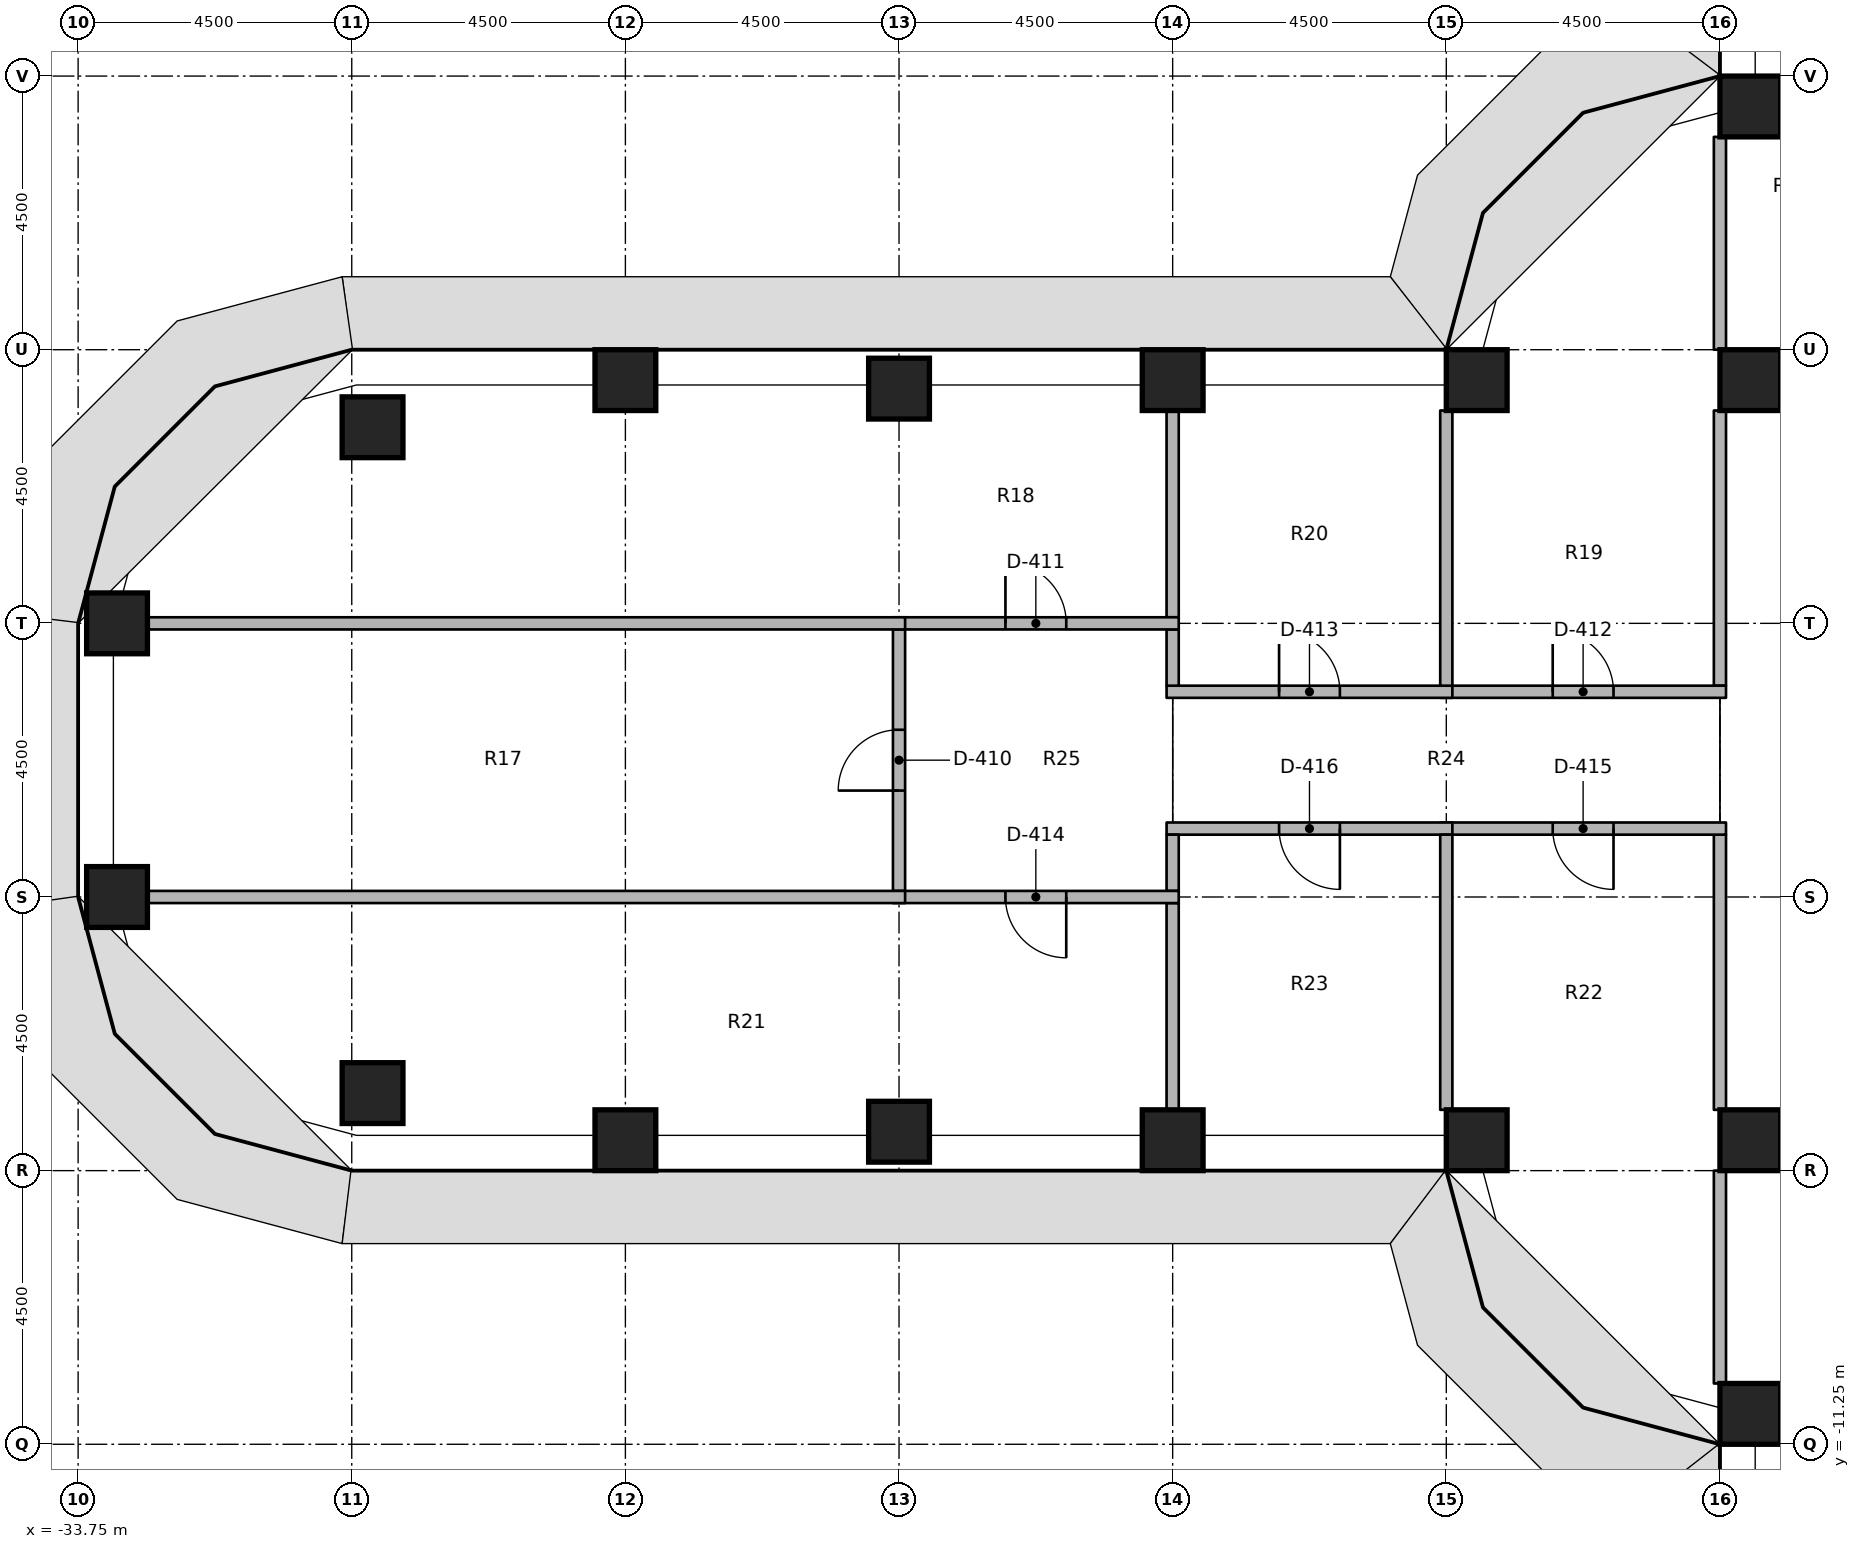
"""IFC4 building model, lengths in metres.
Left out: names, types, materials, properties, quantities, classifications, styles, units other than length and angle.
Written with IfcOpenShell. Run it as: python <this file> out.ifc"""

import sys

from ifc_helpers import new_model, si_unit, direction, frame, frame_2d, origin, origin_2d, place, context, subcontext, project, spatial, rectangle, extrude, element, fill, save


model = new_model("IFC4")
c1 = context("Model", 3, precision=1e-05, world=origin(), true_north=direction((0.0, 1.0)))
c2 = subcontext(c1, "Body", "Model", "MODEL_VIEW")
j1 = project(units=[si_unit("LENGTHUNIT", "METRE"), si_unit("PLANEANGLEUNIT", "RADIAN")], contexts=[c1])
p1 = place(None, origin())
s1 = spatial("IfcSite", under=j1, at=p1, CompositionType="ELEMENT")
p2 = place(p1, origin())
s2 = spatial("IfcBuilding", under=s1, at=p2, CompositionType="ELEMENT")
p3 = place(p2, frame((0.0, 0.0, 56.4)))
s3 = spatial("IfcBuildingStorey", under=s2, at=p3, CompositionType="ELEMENT", Elevation=56.4)
for number, where, z_axis, x_axis in (
    (1, (-33.11, -2.25, 0.0), (0.0, 0.0, 1.0), (1.0, 0.0, 0.0)),
    (2, (-33.11, 2.25, 0.0), (0.0, 0.0, 1.0), (1.0, 0.0, 0.0)),
    (3, (-28.908, -5.475, 0.0), (0.0, 0.0, 1.0), (1.0, 0.0, 0.0)),
    (4, (-28.908, 5.475, 0.0), (0.0, 0.0, 1.0), (1.0, 0.0, 0.0)),
    (5, (-24.75, -6.25, 0.0), (0.0, 0.0, 1.0), (1.0, 0.0, 0.0)),
    (6, (-24.75, 6.25, 0.0), (0.0, 0.0, 1.0), (1.0, 0.0, 0.0)),
    (7, (-20.25, -6.11, 0.0), (0.0, 0.0, 1.0), (1.0, 0.0, 0.0)),
    (8, (-20.25, 6.11, 0.0), (0.0, 0.0, 1.0), (1.0, 0.0, 0.0)),
    (9, (-15.75, -6.25, 0.0), (0.0, 0.0, 1.0), (1.0, 0.0, 0.0)),
    (10, (-15.75, 6.25, 0.0), (0.0, 0.0, 1.0), (1.0, 0.0, 0.0)),
    (11, (-10.75, -6.25, 0.0), (0.0, 0.0, 1.0), (1.0, 0.0, 0.0)),
    (12, (-10.75, 6.25, 0.0), (0.0, 0.0, 1.0), (1.0, 0.0, 0.0)),
    (13, (-6.25, -10.75, 0.0), (0.0, 0.0, 1.0), (1.0, 0.0, 0.0)),
    (14, (-6.25, -6.25, 0.0), (0.0, 0.0, 1.0), (1.0, 0.0, 0.0)),
    (15, (-6.25, 6.25, 0.0), (0.0, 0.0, 1.0), (1.0, 0.0, 0.0)),
    (16, (-6.25, 10.75, 0.0), (0.0, 0.0, 1.0), (1.0, 0.0, 0.0)),
):
    element("IfcColumn", number, at=place(p3, frame(where, z_axis=z_axis, x_axis=x_axis)), inside=s3, PredefinedType="COLUMN", context=c2, shape_type="SweptSolid", body=[
        extrude(rectangle(XDim=1.0, YDim=1.0, at=origin_2d()), origin(), (0.0, 0.0, 1.0), 4.05),
    ])
p4 = place(p3, frame((-6.75, 1.225, 0.0), z_axis=(0.0, 0.0, 1.0), x_axis=(0.0, 1.0, 0.0)))
e17 = element("IfcWall", 17, at=p4, inside=s3, PredefinedType="PARTITIONING", context=c2, shape_type="SweptSolid", body=[
    extrude(rectangle(XDim=4.525, YDim=0.2, at=frame_2d((2.262, 0.0))), origin(), (0.0, 0.0, 1.0), 3.131),
])
for number, where, z_axis, x_axis in (
    (18, (-6.75, 6.75, 0.0), (0.0, 0.0, 1.0), (0.0, 1.0, 0.0)),
    (19, (-6.75, -10.25, 0.0), (0.0, 0.0, 1.0), (0.0, 1.0, 0.0)),
):
    element("IfcWall", number, at=place(p3, frame(where, z_axis=z_axis, x_axis=x_axis)), inside=s3, PredefinedType="PARTITIONING", context=c2, shape_type="SweptSolid", body=[
        extrude(rectangle(XDim=3.5, YDim=0.2, at=frame_2d((1.75, 0.0))), origin(), (0.0, 0.0, 1.0), 3.131),
    ])
p5 = place(p3, frame((-6.75, -5.75, 0.0), z_axis=(0.0, 0.0, 1.0), x_axis=(0.0, 1.0, 0.0)))
e20 = element("IfcWall", 20, at=p5, inside=s3, PredefinedType="PARTITIONING", context=c2, shape_type="SweptSolid", body=[
    extrude(rectangle(XDim=4.525, YDim=0.2, at=frame_2d((2.262, 0.0))), origin(), (0.0, 0.0, 1.0), 3.131),
])
p6 = place(p3, frame((-11.35, 1.125, 0.0), z_axis=(0.0, 0.0, 1.0), x_axis=(1.0, 0.0, 0.0)))
e21 = element("IfcWall", 21, at=p6, inside=s3, PredefinedType="PARTITIONING", context=c2, shape_type="SweptSolid", body=[
    extrude(rectangle(XDim=4.7, YDim=0.2, at=frame_2d((2.35, 0.0))), origin(), (0.0, 0.0, 1.0), 3.131),
])
p7 = place(p6, frame((1.85, 0.0, 0.0)))
e22 = element("IfcOpeningElement", 22, at=p7, cuts=e21, PredefinedType="OPENING", context=c2, shape_type="SweptSolid", body=[
    extrude(rectangle(XDim=1.0, YDim=2.1, at=frame_2d((0.5, 1.05))), frame((0.0, 0.11, 0.0), z_axis=(0.0, -1.0, 0.0), x_axis=(1.0, 0.0, 0.0)), (0.0, 0.0, 1.0), 0.22),
])
p8 = place(p3, frame((-6.65, -1.125, 0.0), z_axis=(0.0, 0.0, 1.0), x_axis=(-1.0, 0.0, 0.0)))
e23 = element("IfcWall", 23, at=p8, inside=s3, PredefinedType="PARTITIONING", context=c2, shape_type="SweptSolid", body=[
    extrude(rectangle(XDim=4.7, YDim=0.2, at=frame_2d((2.35, 0.0))), origin(), (0.0, 0.0, 1.0), 3.131),
])
p9 = place(p8, frame((1.85, 0.0, 0.0)))
e24 = element("IfcOpeningElement", 24, at=p9, cuts=e23, PredefinedType="OPENING", context=c2, shape_type="SweptSolid", body=[
    extrude(rectangle(XDim=1.0, YDim=2.1, at=frame_2d((0.5, 1.05))), frame((0.0, 0.11, 0.0), z_axis=(0.0, -1.0, 0.0), x_axis=(1.0, 0.0, 0.0)), (0.0, 0.0, 1.0), 0.22),
])
p10 = place(p3, frame((-15.85, 1.125, 0.0), z_axis=(0.0, 0.0, 1.0), x_axis=(1.0, 0.0, 0.0)))
e25 = element("IfcWall", 25, at=p10, inside=s3, PredefinedType="PARTITIONING", context=c2, shape_type="SweptSolid", body=[
    extrude(rectangle(XDim=4.7, YDim=0.2, at=frame_2d((2.35, 0.0))), origin(), (0.0, 0.0, 1.0), 3.131),
])
p11 = place(p10, frame((1.85, 0.0, 0.0)))
e26 = element("IfcOpeningElement", 26, at=p11, cuts=e25, PredefinedType="OPENING", context=c2, shape_type="SweptSolid", body=[
    extrude(rectangle(XDim=1.0, YDim=2.1, at=frame_2d((0.5, 1.05))), frame((0.0, 0.11, 0.0), z_axis=(0.0, -1.0, 0.0), x_axis=(1.0, 0.0, 0.0)), (0.0, 0.0, 1.0), 0.22),
])
p12 = place(p3, frame((-11.15, -1.125, 0.0), z_axis=(0.0, 0.0, 1.0), x_axis=(-1.0, 0.0, 0.0)))
e27 = element("IfcWall", 27, at=p12, inside=s3, PredefinedType="PARTITIONING", context=c2, shape_type="SweptSolid", body=[
    extrude(rectangle(XDim=4.7, YDim=0.2, at=frame_2d((2.35, 0.0))), origin(), (0.0, 0.0, 1.0), 3.131),
])
p13 = place(p12, frame((1.85, 0.0, 0.0)))
e28 = element("IfcOpeningElement", 28, at=p13, cuts=e27, PredefinedType="OPENING", context=c2, shape_type="SweptSolid", body=[
    extrude(rectangle(XDim=1.0, YDim=2.1, at=frame_2d((0.5, 1.05))), frame((0.0, 0.11, 0.0), z_axis=(0.0, -1.0, 0.0), x_axis=(1.0, 0.0, 0.0)), (0.0, 0.0, 1.0), 0.22),
])
for number, where, z_axis, x_axis in (
    (29, (-11.25, 1.225, 0.0), (0.0, 0.0, 1.0), (0.0, 1.0, 0.0)),
    (30, (-11.25, -5.75, 0.0), (0.0, 0.0, 1.0), (0.0, 1.0, 0.0)),
):
    element("IfcWall", number, at=place(p3, frame(where, z_axis=z_axis, x_axis=x_axis)), inside=s3, PredefinedType="PARTITIONING", context=c2, shape_type="SweptSolid", body=[
        extrude(rectangle(XDim=4.525, YDim=0.2, at=frame_2d((2.262, 0.0))), origin(), (0.0, 0.0, 1.0), 3.131),
    ])
p14 = place(p3, frame((-15.75, 1.225, 0.0), z_axis=(0.0, 0.0, 1.0), x_axis=(0.0, 1.0, 0.0)))
e31 = element("IfcWall", 31, at=p14, inside=s3, PredefinedType="PARTITIONING", context=c2, shape_type="SweptSolid", body=[
    extrude(rectangle(XDim=0.925, YDim=0.2, at=frame_2d((0.462, 0.0))), origin(), (0.0, 0.0, 1.0), 3.131),
])
p15 = place(p3, frame((-15.75, 2.35, 0.0), z_axis=(0.0, 0.0, 1.0), x_axis=(0.0, 1.0, 0.0)))
e32 = element("IfcWall", 32, at=p15, inside=s3, PredefinedType="PARTITIONING", context=c2, shape_type="SweptSolid", body=[
    extrude(rectangle(XDim=3.4, YDim=0.2, at=frame_2d((1.7, 0.0))), origin(), (0.0, 0.0, 1.0), 3.131),
])
p16 = place(p3, frame((-15.75, -2.15, 0.0), z_axis=(0.0, 0.0, 1.0), x_axis=(0.0, 1.0, 0.0)))
e33 = element("IfcWall", 33, at=p16, inside=s3, PredefinedType="PARTITIONING", context=c2, shape_type="SweptSolid", body=[
    extrude(rectangle(XDim=0.925, YDim=0.2, at=frame_2d((0.462, 0.0))), origin(), (0.0, 0.0, 1.0), 3.131),
])
p17 = place(p3, frame((-15.75, -5.75, 0.0), z_axis=(0.0, 0.0, 1.0), x_axis=(0.0, 1.0, 0.0)))
e34 = element("IfcWall", 34, at=p17, inside=s3, PredefinedType="PARTITIONING", context=c2, shape_type="SweptSolid", body=[
    extrude(rectangle(XDim=3.4, YDim=0.2, at=frame_2d((1.7, 0.0))), origin(), (0.0, 0.0, 1.0), 3.131),
])
p18 = place(p3, frame((-20.35, 2.25, 0.0), z_axis=(0.0, 0.0, 1.0), x_axis=(1.0, 0.0, 0.0)))
e35 = element("IfcWall", 35, at=p18, inside=s3, PredefinedType="PARTITIONING", context=c2, shape_type="SweptSolid", body=[
    extrude(rectangle(XDim=4.7, YDim=0.2, at=frame_2d((2.35, 0.0))), origin(), (0.0, 0.0, 1.0), 3.131),
])
p19 = place(p18, frame((1.85, 0.0, 0.0)))
e36 = element("IfcOpeningElement", 36, at=p19, cuts=e35, PredefinedType="OPENING", context=c2, shape_type="SweptSolid", body=[
    extrude(rectangle(XDim=1.0, YDim=2.1, at=frame_2d((0.5, 1.05))), frame((0.0, 0.11, 0.0), z_axis=(0.0, -1.0, 0.0), x_axis=(1.0, 0.0, 0.0)), (0.0, 0.0, 1.0), 0.22),
])
p20 = place(p3, frame((-15.65, -2.25, 0.0), z_axis=(0.0, 0.0, 1.0), x_axis=(-1.0, 0.0, 0.0)))
e37 = element("IfcWall", 37, at=p20, inside=s3, PredefinedType="PARTITIONING", context=c2, shape_type="SweptSolid", body=[
    extrude(rectangle(XDim=4.7, YDim=0.2, at=frame_2d((2.35, 0.0))), origin(), (0.0, 0.0, 1.0), 3.131),
])
p21 = place(p20, frame((1.85, 0.0, 0.0)))
e38 = element("IfcOpeningElement", 38, at=p21, cuts=e37, PredefinedType="OPENING", context=c2, shape_type="SweptSolid", body=[
    extrude(rectangle(XDim=1.0, YDim=2.1, at=frame_2d((0.5, 1.05))), frame((0.0, 0.11, 0.0), z_axis=(0.0, -1.0, 0.0), x_axis=(1.0, 0.0, 0.0)), (0.0, 0.0, 1.0), 0.22),
])
p22 = place(p3, frame((-20.25, -2.15, 0.0), z_axis=(0.0, 0.0, 1.0), x_axis=(0.0, 1.0, 0.0)))
e39 = element("IfcWall", 39, at=p22, inside=s3, PredefinedType="PARTITIONING", context=c2, shape_type="SweptSolid", body=[
    extrude(rectangle(XDim=4.3, YDim=0.2, at=frame_2d((2.15, 0.0))), origin(), (0.0, 0.0, 1.0), 3.131),
])
p23 = place(p22, frame((1.65, 0.0, 0.0)))
e40 = element("IfcOpeningElement", 40, at=p23, cuts=e39, PredefinedType="OPENING", context=c2, shape_type="SweptSolid", body=[
    extrude(rectangle(XDim=1.0, YDim=2.1, at=frame_2d((0.5, 1.05))), frame((0.0, 0.11, 0.0), z_axis=(0.0, -1.0, 0.0), x_axis=(1.0, 0.0, 0.0)), (0.0, 0.0, 1.0), 0.22),
])
for number, where, z_axis, x_axis in (
    (41, (-32.61, 2.25, 0.0), (0.0, 0.0, 1.0), (1.0, 0.0, 0.0)),
    (42, (-32.61, -2.25, 0.0), (0.0, 0.0, 1.0), (1.0, 0.0, 0.0)),
):
    element("IfcWall", number, at=place(p3, frame(where, z_axis=z_axis, x_axis=x_axis)), inside=s3, PredefinedType="PARTITIONING", context=c2, shape_type="SweptSolid", body=[
        extrude(rectangle(XDim=12.46, YDim=0.2, at=frame_2d((6.23, 0.0))), origin(), (0.0, 0.0, 1.0), 3.131),
    ])
p24 = place(p23, origin())
e43 = element("IfcDoor", 43, at=p24, inside=s3, OperationType="SINGLE_SWING_RIGHT", PredefinedType="DOOR", context=c2, shape_type="SweptSolid", body=[
    extrude(rectangle(XDim=1.0, YDim=2.1, at=frame_2d((0.5, 1.05))), frame((0.0, 0.025, 0.0), z_axis=(0.0, -1.0, 0.0), x_axis=(1.0, 0.0, 0.0)), (0.0, 0.0, 1.0), 0.05),
])
fill(e40, e43)
p25 = place(p19, origin())
e44 = element("IfcDoor", 44, at=p25, inside=s3, OperationType="SINGLE_SWING_RIGHT", PredefinedType="DOOR", context=c2, shape_type="SweptSolid", body=[
    extrude(rectangle(XDim=1.0, YDim=2.1, at=frame_2d((0.5, 1.05))), frame((0.0, 0.025, 0.0), z_axis=(0.0, -1.0, 0.0), x_axis=(1.0, 0.0, 0.0)), (0.0, 0.0, 1.0), 0.05),
])
fill(e36, e44)
p26 = place(p7, origin())
e45 = element("IfcDoor", 45, at=p26, inside=s3, OperationType="SINGLE_SWING_RIGHT", PredefinedType="DOOR", context=c2, shape_type="SweptSolid", body=[
    extrude(rectangle(XDim=1.0, YDim=2.1, at=frame_2d((0.5, 1.05))), frame((0.0, 0.025, 0.0), z_axis=(0.0, -1.0, 0.0), x_axis=(1.0, 0.0, 0.0)), (0.0, 0.0, 1.0), 0.05),
])
fill(e22, e45)
p27 = place(p11, origin())
e46 = element("IfcDoor", 46, at=p27, inside=s3, OperationType="SINGLE_SWING_RIGHT", PredefinedType="DOOR", context=c2, shape_type="SweptSolid", body=[
    extrude(rectangle(XDim=1.0, YDim=2.1, at=frame_2d((0.5, 1.05))), frame((0.0, 0.025, 0.0), z_axis=(0.0, -1.0, 0.0), x_axis=(1.0, 0.0, 0.0)), (0.0, 0.0, 1.0), 0.05),
])
fill(e26, e46)
p28 = place(p21, origin())
e47 = element("IfcDoor", 47, at=p28, inside=s3, OperationType="SINGLE_SWING_LEFT", PredefinedType="DOOR", context=c2, shape_type="SweptSolid", body=[
    extrude(rectangle(XDim=1.0, YDim=2.1, at=frame_2d((0.5, 1.05))), frame((0.0, 0.025, 0.0), z_axis=(0.0, -1.0, 0.0), x_axis=(1.0, 0.0, 0.0)), (0.0, 0.0, 1.0), 0.05),
])
fill(e38, e47)
p29 = place(p9, origin())
e48 = element("IfcDoor", 48, at=p29, inside=s3, OperationType="SINGLE_SWING_RIGHT", PredefinedType="DOOR", context=c2, shape_type="SweptSolid", body=[
    extrude(rectangle(XDim=1.0, YDim=2.1, at=frame_2d((0.5, 1.05))), frame((0.0, 0.025, 0.0), z_axis=(0.0, -1.0, 0.0), x_axis=(1.0, 0.0, 0.0)), (0.0, 0.0, 1.0), 0.05),
])
fill(e24, e48)
p30 = place(p13, origin())
e49 = element("IfcDoor", 49, at=p30, inside=s3, OperationType="SINGLE_SWING_RIGHT", PredefinedType="DOOR", context=c2, shape_type="SweptSolid", body=[
    extrude(rectangle(XDim=1.0, YDim=2.1, at=frame_2d((0.5, 1.05))), frame((0.0, 0.025, 0.0), z_axis=(0.0, -1.0, 0.0), x_axis=(1.0, 0.0, 0.0)), (0.0, 0.0, 1.0), 0.05),
])
fill(e28, e49)
save(model, sys.argv[1])
